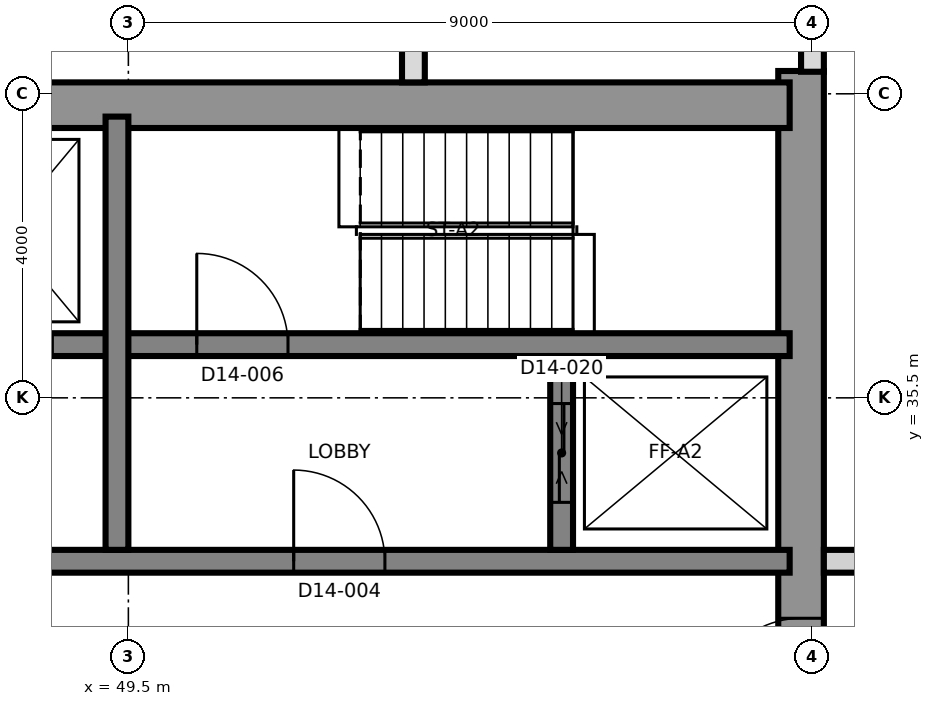
"""IFC4 building model, lengths in metres.
Left out: names, types, materials, properties, quantities, classifications, styles, units other than length and angle.
Written with IfcOpenShell. Run it as: python <this file> out.ifc"""

import sys

from ifc_helpers import new_model, si_unit, direction, frame, frame_2d, origin, place, context, subcontext, project, spatial, rectangle, extrude, element, fill, save


model = new_model("IFC4")
c1 = context("Model", 3, precision=1e-05, world=origin(), true_north=direction((0.0, 1.0)))
c2 = subcontext(c1, "Body", "Model", "MODEL_VIEW")
j1 = project(units=[si_unit("LENGTHUNIT", "METRE"), si_unit("PLANEANGLEUNIT", "RADIAN")], contexts=[c1])
p1 = place(None, origin())
s1 = spatial("IfcSite", under=j1, at=p1, CompositionType="ELEMENT")
p2 = place(p1, origin())
s2 = spatial("IfcBuilding", under=s1, at=p2, CompositionType="ELEMENT")
p3 = place(p2, frame((0.0, 0.0, 149.6)))
s3 = spatial("IfcBuildingStorey", under=s2, at=p3, CompositionType="ELEMENT", Elevation=149.6)
p4 = place(p3, frame((58.35, 21.2, 0.0), z_axis=(0.0, 0.0, 1.0), x_axis=(0.0, 1.0, 0.0)))
e1 = element("IfcWall", 1, at=p4, inside=s3, PredefinedType="SHEAR", context=c2, shape_type="SweptSolid", body=[
    extrude(rectangle(XDim=18.6, YDim=0.6, at=frame_2d((9.3, 0.0))), origin(), (0.0, 0.0, 1.0), 3.7),
])
p5 = place(p4, frame((10.2, 0.0, 0.0)))
e2 = element("IfcOpeningElement", 2, at=p5, cuts=e1, PredefinedType="OPENING", context=c2, shape_type="SweptSolid", body=[
    extrude(rectangle(XDim=1.2, YDim=2.1, at=frame_2d((0.6, 1.05))), frame((0.0, 0.31, 0.0), z_axis=(0.0, -1.0, 0.0), x_axis=(1.0, 0.0, 0.0)), (0.0, 0.0, 1.0), 0.62),
])
p6 = place(p3, frame((31.2, 39.35, 0.0), z_axis=(0.0, 0.0, 1.0), x_axis=(1.0, 0.0, 0.0)))
e3 = element("IfcWall", 3, at=p6, inside=s3, PredefinedType="SHEAR", context=c2, shape_type="SweptSolid", body=[
    extrude(rectangle(XDim=27.0, YDim=0.6, at=frame_2d((13.5, 0.0))), origin(), (0.0, 0.0, 1.0), 3.7),
])
p7 = place(p6, frame((10.5, 0.0, 0.0)))
e4 = element("IfcOpeningElement", 4, at=p7, cuts=e3, PredefinedType="OPENING", context=c2, shape_type="SweptSolid", body=[
    extrude(rectangle(XDim=1.2, YDim=2.1, at=frame_2d((0.6, 1.05))), frame((0.0, 0.31, 0.0), z_axis=(0.0, -1.0, 0.0), x_axis=(1.0, 0.0, 0.0)), (0.0, 0.0, 1.0), 0.62),
])
p8 = place(p3, frame((31.8, 33.35, 0.0), z_axis=(0.0, 0.0, 1.0), x_axis=(1.0, 0.0, 0.0)))
e5 = element("IfcWall", 5, at=p8, inside=s3, PredefinedType="SHEAR", context=c2, shape_type="SweptSolid", body=[
    extrude(rectangle(XDim=26.4, YDim=0.3, at=frame_2d((13.2, 0.0))), origin(), (0.0, 0.0, 1.0), 3.7),
])
p9 = place(p8, frame((13.85, 0.0, 0.0)))
e6 = element("IfcOpeningElement", 6, at=p9, cuts=e5, PredefinedType="OPENING", context=c2, shape_type="SweptSolid", body=[
    extrude(rectangle(XDim=1.4, YDim=2.1, at=frame_2d((0.7, 1.05))), frame((0.0, 0.16, 0.0), z_axis=(0.0, -1.0, 0.0), x_axis=(1.0, 0.0, 0.0)), (0.0, 0.0, 1.0), 0.32),
])
p10 = place(p8, frame((5.325, 0.0, 0.0)))
e7 = element("IfcOpeningElement", 7, at=p10, cuts=e5, PredefinedType="OPENING", context=c2, shape_type="SweptSolid", body=[
    extrude(rectangle(XDim=1.2, YDim=2.1, at=frame_2d((0.6, 1.05))), frame((0.0, 0.16, 0.0), z_axis=(0.0, -1.0, 0.0), x_axis=(1.0, 0.0, 0.0)), (0.0, 0.0, 1.0), 0.32),
])
p11 = place(p8, frame((19.875, 0.0, 0.0)))
e8 = element("IfcOpeningElement", 8, at=p11, cuts=e5, PredefinedType="OPENING", context=c2, shape_type="SweptSolid", body=[
    extrude(rectangle(XDim=1.2, YDim=2.1, at=frame_2d((0.6, 1.05))), frame((0.0, 0.16, 0.0), z_axis=(0.0, -1.0, 0.0), x_axis=(1.0, 0.0, 0.0)), (0.0, 0.0, 1.0), 0.32),
])
p12 = place(p3, frame((43.5, 36.2, 0.0), z_axis=(0.0, 0.0, 1.0), x_axis=(1.0, 0.0, 0.0)))
e9 = element("IfcWall", 9, at=p12, inside=s3, PredefinedType="SHEAR", context=c2, shape_type="SweptSolid", body=[
    extrude(rectangle(XDim=14.7, YDim=0.3, at=frame_2d((7.35, 0.0))), origin(), (0.0, 0.0, 1.0), 3.7),
])
p13 = place(p12, frame((6.9, 0.0, 0.0)))
e10 = element("IfcOpeningElement", 10, at=p13, cuts=e9, PredefinedType="OPENING", context=c2, shape_type="SweptSolid", body=[
    extrude(rectangle(XDim=1.2, YDim=2.1, at=frame_2d((0.6, 1.05))), frame((0.0, 0.16, 0.0), z_axis=(0.0, -1.0, 0.0), x_axis=(1.0, 0.0, 0.0)), (0.0, 0.0, 1.0), 0.32),
])
p14 = place(p12, frame((0.7, 0.0, 0.0)))
e11 = element("IfcOpeningElement", 11, at=p14, cuts=e9, PredefinedType="OPENING", context=c2, shape_type="SweptSolid", body=[
    extrude(rectangle(XDim=1.3, YDim=2.4, at=frame_2d((0.65, 1.2))), frame((0.0, 0.16, 0.0), z_axis=(0.0, -1.0, 0.0), x_axis=(1.0, 0.0, 0.0)), (0.0, 0.0, 1.0), 0.32),
])
p15 = place(p12, frame((3.7, 0.0, 0.0)))
e12 = element("IfcOpeningElement", 12, at=p15, cuts=e9, PredefinedType="OPENING", context=c2, shape_type="SweptSolid", body=[
    extrude(rectangle(XDim=1.3, YDim=2.4, at=frame_2d((0.65, 1.2))), frame((0.0, 0.16, 0.0), z_axis=(0.0, -1.0, 0.0), x_axis=(1.0, 0.0, 0.0)), (0.0, 0.0, 1.0), 0.32),
])
p16 = place(p3, frame((49.35, 33.5, 0.0), z_axis=(0.0, 0.0, 1.0), x_axis=(0.0, 1.0, 0.0)))
e13 = element("IfcWall", 13, at=p16, inside=s3, PredefinedType="SHEAR", context=c2, shape_type="SweptSolid", body=[
    extrude(rectangle(XDim=5.7, YDim=0.3, at=frame_2d((2.85, 0.0))), origin(), (0.0, 0.0, 1.0), 3.7),
])
p17 = place(p3, frame((55.2, 33.5, 0.0), z_axis=(0.0, 0.0, 1.0), x_axis=(0.0, 1.0, 0.0)))
e14 = element("IfcWall", 14, at=p17, inside=s3, PredefinedType="SHEAR", context=c2, shape_type="SweptSolid", body=[
    extrude(rectangle(XDim=2.55, YDim=0.3, at=frame_2d((1.275, 0.0))), origin(), (0.0, 0.0, 1.0), 3.7),
])
p18 = place(p17, frame((0.625, 0.0, 0.0)))
e15 = element("IfcOpeningElement", 15, at=p18, cuts=e14, PredefinedType="OPENING", context=c2, shape_type="SweptSolid", body=[
    extrude(rectangle(XDim=1.3, YDim=2.4, at=frame_2d((0.65, 1.2))), frame((0.0, 0.16, 0.0), z_axis=(0.0, -1.0, 0.0), x_axis=(1.0, 0.0, 0.0)), (0.0, 0.0, 1.0), 0.32),
])
p19 = place(p3, frame((58.65, 33.35, 0.0), z_axis=(0.0, 0.0, 1.0), x_axis=(1.0, 0.0, 0.0)))
e16 = element("IfcWall", 16, at=p19, inside=s3, PredefinedType="PARTITIONING", context=c2, shape_type="SweptSolid", body=[
    extrude(rectangle(XDim=8.5, YDim=0.3, at=frame_2d((4.25, 0.0))), origin(), (0.0, 0.0, 1.0), 3.4),
])
p20 = place(p19, frame((0.772, 0.0, 0.0)))
e17 = element("IfcOpeningElement", 17, at=p20, cuts=e16, PredefinedType="OPENING", context=c2, shape_type="SweptSolid", body=[
    extrude(rectangle(XDim=1.0, YDim=2.1, at=frame_2d((0.5, 1.05))), frame((0.0, 0.16, 0.0), z_axis=(0.0, -1.0, 0.0), x_axis=(1.0, 0.0, 0.0)), (0.0, 0.0, 1.0), 0.32),
])
p21 = place(p19, frame((6.422, 0.0, 0.0)))
e18 = element("IfcOpeningElement", 18, at=p21, cuts=e16, PredefinedType="OPENING", context=c2, shape_type="SweptSolid", body=[
    extrude(rectangle(XDim=1.0, YDim=2.1, at=frame_2d((0.5, 1.05))), frame((0.0, 0.16, 0.0), z_axis=(0.0, -1.0, 0.0), x_axis=(1.0, 0.0, 0.0)), (0.0, 0.0, 1.0), 0.32),
])
p22 = place(p3, frame((53.25, 39.65, 0.0), z_axis=(0.0, 0.0, 1.0), x_axis=(0.0, 1.0, 0.0)))
e19 = element("IfcWall", 19, at=p22, inside=s3, PredefinedType="PARTITIONING", context=c2, shape_type="SweptSolid", body=[
    extrude(rectangle(XDim=1.915, YDim=0.3, at=frame_2d((0.958, 0.0))), origin(), (0.0, 0.0, 1.0), 3.35),
])
p23 = place(p3, frame((58.5, 39.79, 0.0), z_axis=(0.0, 0.0, 1.0), x_axis=(0.0, 1.0, 0.0)))
e20 = element("IfcWall", 20, at=p23, inside=s3, PredefinedType="PARTITIONING", context=c2, shape_type="SweptSolid", body=[
    extrude(rectangle(XDim=0.86, YDim=0.3, at=frame_2d((0.43, 0.0))), origin(), (0.0, 0.0, 1.0), 3.35),
])
p24 = place(p11, origin())
e21 = element("IfcDoor", 21, at=p24, inside=s3, OperationType="SINGLE_SWING_RIGHT", PredefinedType="DOOR", context=c2, shape_type="SweptSolid", body=[
    extrude(rectangle(XDim=1.2, YDim=2.1, at=frame_2d((0.6, 1.05))), frame((0.0, 0.025, 0.0), z_axis=(0.0, -1.0, 0.0), x_axis=(1.0, 0.0, 0.0)), (0.0, 0.0, 1.0), 0.05),
])
fill(e8, e21)
p25 = place(p13, origin())
e22 = element("IfcDoor", 22, at=p25, inside=s3, OperationType="SINGLE_SWING_LEFT", PredefinedType="DOOR", context=c2, shape_type="SweptSolid", body=[
    extrude(rectangle(XDim=1.2, YDim=2.1, at=frame_2d((0.6, 1.05))), frame((0.0, 0.025, 0.0), z_axis=(0.0, -1.0, 0.0), x_axis=(1.0, 0.0, 0.0)), (0.0, 0.0, 1.0), 0.05),
])
fill(e10, e22)
p26 = place(p5, origin())
e23 = element("IfcDoor", 23, at=p26, inside=s3, OperationType="SINGLE_SWING_LEFT", PredefinedType="DOOR", context=c2, shape_type="SweptSolid", body=[
    extrude(rectangle(XDim=1.2, YDim=2.1, at=frame_2d((0.6, 1.05))), frame((0.0, 0.025, 0.0), z_axis=(0.0, -1.0, 0.0), x_axis=(1.0, 0.0, 0.0)), (0.0, 0.0, 1.0), 0.05),
])
fill(e2, e23)
p27 = place(p18, origin())
e24 = element("IfcDoor", 24, at=p27, inside=s3, OperationType="SLIDING_TO_LEFT", PredefinedType="DOOR", context=c2, shape_type="SweptSolid", body=[
    extrude(rectangle(XDim=1.3, YDim=2.4, at=frame_2d((0.65, 1.2))), frame((0.0, 0.025, 0.0), z_axis=(0.0, -1.0, 0.0), x_axis=(1.0, 0.0, 0.0)), (0.0, 0.0, 1.0), 0.05),
])
fill(e15, e24)
save(model, sys.argv[1])
